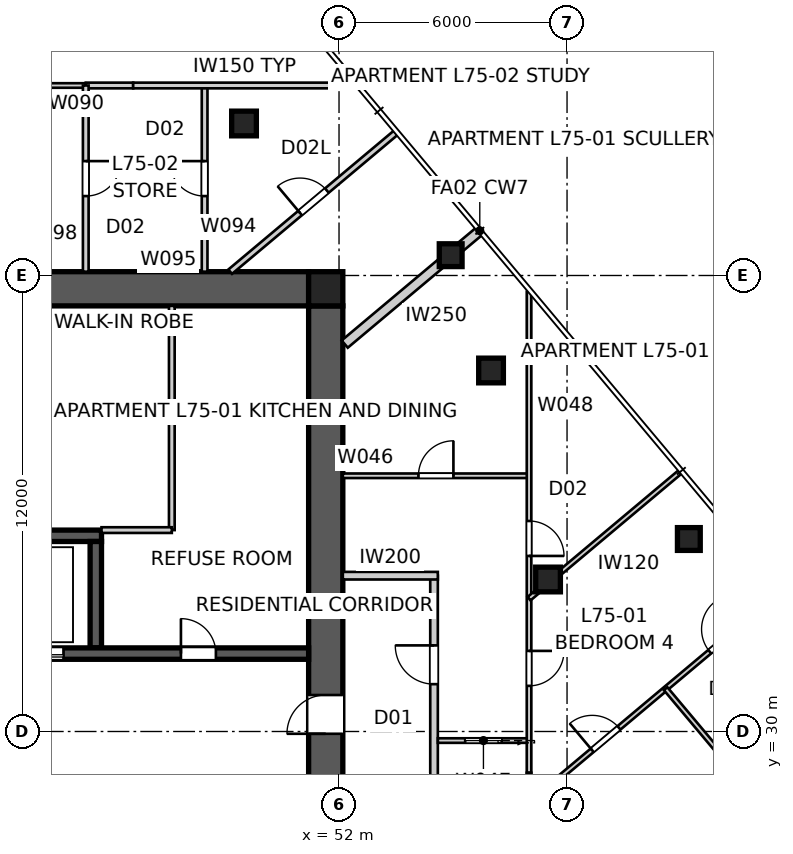
"""IFC4 building model, lengths in metres.
Left out: names, types, materials, properties, quantities, classifications, styles, units other than length and angle.
Written with IfcOpenShell. Run it as: python <this file> out.ifc"""

import sys

from ifc_helpers import new_model, si_unit, direction, frame, frame_2d, origin, origin_2d, place, context, subcontext, project, spatial, polyline, rectangle, outline, extrude, element, fill, save


model = new_model("IFC4")
c1 = context("Model", 3, precision=1e-05, world=origin(), true_north=direction((0.0, 1.0)))
c2 = subcontext(c1, "Body", "Model", "MODEL_VIEW")
j1 = project(units=[si_unit("LENGTHUNIT", "METRE"), si_unit("PLANEANGLEUNIT", "RADIAN")], contexts=[c1])
p1 = place(None, origin())
s1 = spatial("IfcSite", under=j1, at=p1, CompositionType="ELEMENT")
p2 = place(p1, origin())
s2 = spatial("IfcBuilding", under=s1, at=p2, CompositionType="ELEMENT")
p3 = place(p2, frame((0.0, 0.0, 272.6)))
s3 = spatial("IfcBuildingStorey", under=s2, at=p3, CompositionType="ELEMENT", Elevation=272.6)
p4 = place(p3, frame((28.8, 41.65, 0.0), z_axis=(0.0, 0.0, 1.0), x_axis=(1.0, 0.0, 0.0)))
e1 = element("IfcWall", 1, at=p4, inside=s3, PredefinedType="SHEAR", context=c2, shape_type="SweptSolid", body=[
    extrude(outline(polyline([(0.0, -0.45), (22.4, -0.45), (22.4, -0.025), (22.85, -0.025), (22.85, 0.025), (22.4, 0.025), (22.4, 0.45), (0.0, 0.45), (0.0, 0.025), (-0.45, 0.025), (-0.45, -0.025), (0.0, -0.025), (0.0, -0.45)])), origin(), (0.0, 0.0, 1.0), 3.4),
])
p5 = place(p3, frame((51.65, 18.8, 0.0), z_axis=(0.0, 0.0, 1.0), x_axis=(0.0, 1.0, 0.0)))
e2 = element("IfcWall", 2, at=p5, inside=s3, PredefinedType="SHEAR", context=c2, shape_type="SweptSolid", body=[
    extrude(outline(polyline([(0.0, -0.45), (22.4, -0.45), (22.4, -0.025), (22.85, -0.025), (22.85, 0.025), (22.4, 0.025), (22.4, 0.45), (0.0, 0.45), (0.0, 0.025), (-0.45, 0.025), (-0.45, -0.025), (0.0, -0.025), (0.0, -0.45)])), origin(), (0.0, 0.0, 1.0), 3.4),
])
p6 = place(p5, frame((11.14, 0.0, 0.0)))
e3 = element("IfcOpeningElement", 3, at=p6, cuts=e2, PredefinedType="OPENING", context=c2, shape_type="SweptSolid", body=[
    extrude(rectangle(XDim=1.02, YDim=2.4, at=frame_2d((0.51, 1.2))), frame((0.0, 0.46, 0.0), z_axis=(0.0, -1.0, 0.0), x_axis=(1.0, 0.0, 0.0)), (0.0, 0.0, 1.0), 0.92),
])
p7 = place(p3, frame((28.8, 32.05, 0.0), z_axis=(0.0, 0.0, 1.0), x_axis=(1.0, 0.0, 0.0)))
e4 = element("IfcWall", 4, at=p7, inside=s3, PredefinedType="SHEAR", context=c2, shape_type="SweptSolid", body=[
    extrude(rectangle(XDim=22.4, YDim=0.3, at=frame_2d((11.2, 0.0))), origin(), (0.0, 0.0, 1.0), 3.4),
])
p8 = place(p7, frame((19.04, 0.0, 0.0)))
e5 = element("IfcOpeningElement", 5, at=p8, cuts=e4, PredefinedType="OPENING", context=c2, shape_type="SweptSolid", body=[
    extrude(rectangle(XDim=0.92, YDim=2.1, at=frame_2d((0.46, 1.05))), frame((0.0, 0.16, 0.0), z_axis=(0.0, -1.0, 0.0), x_axis=(1.0, 0.0, 0.0)), (0.0, 0.0, 1.0), 0.32),
])
p9 = place(p7, frame((1.265, 0.0, 0.0)))
e6 = element("IfcOpeningElement", 6, at=p9, cuts=e4, PredefinedType="OPENING", context=c2, shape_type="SweptSolid", body=[
    extrude(rectangle(XDim=1.02, YDim=2.1, at=frame_2d((0.51, 1.05))), frame((0.0, 0.16, 0.0), z_axis=(0.0, -1.0, 0.0), x_axis=(1.0, 0.0, 0.0)), (0.0, 0.0, 1.0), 0.32),
])
p10 = place(p7, frame((4.015, 0.0, 0.0)))
e7 = element("IfcOpeningElement", 7, at=p10, cuts=e4, PredefinedType="OPENING", context=c2, shape_type="SweptSolid", body=[
    extrude(rectangle(XDim=0.92, YDim=2.1, at=frame_2d((0.46, 1.05))), frame((0.0, 0.16, 0.0), z_axis=(0.0, -1.0, 0.0), x_axis=(1.0, 0.0, 0.0)), (0.0, 0.0, 1.0), 0.32),
])
p11 = place(p7, frame((6.565, 0.0, 0.0)))
e8 = element("IfcOpeningElement", 8, at=p11, cuts=e4, PredefinedType="OPENING", context=c2, shape_type="SweptSolid", body=[
    extrude(rectangle(XDim=0.92, YDim=2.1, at=frame_2d((0.46, 1.05))), frame((0.0, 0.16, 0.0), z_axis=(0.0, -1.0, 0.0), x_axis=(1.0, 0.0, 0.0)), (0.0, 0.0, 1.0), 0.32),
])
p12 = place(p7, frame((8.89, 0.0, 0.0)))
e9 = element("IfcOpeningElement", 9, at=p12, cuts=e4, PredefinedType="OPENING", context=c2, shape_type="SweptSolid", body=[
    extrude(rectangle(XDim=0.92, YDim=2.1, at=frame_2d((0.46, 1.05))), frame((0.0, 0.16, 0.0), z_axis=(0.0, -1.0, 0.0), x_axis=(1.0, 0.0, 0.0)), (0.0, 0.0, 1.0), 0.32),
])
p13 = place(p7, frame((12.05, 0.0, 0.0)))
e10 = element("IfcOpeningElement", 10, at=p13, cuts=e4, PredefinedType="OPENING", context=c2, shape_type="SweptSolid", body=[
    extrude(rectangle(XDim=1.1, YDim=2.1, at=frame_2d((0.55, 1.05))), frame((0.0, 0.16, 0.0), z_axis=(0.0, -1.0, 0.0), x_axis=(1.0, 0.0, 0.0)), (0.0, 0.0, 1.0), 0.32),
])
p14 = place(p7, frame((14.85, 0.0, 0.0)))
e11 = element("IfcOpeningElement", 11, at=p14, cuts=e4, PredefinedType="OPENING", context=c2, shape_type="SweptSolid", body=[
    extrude(rectangle(XDim=1.1, YDim=2.1, at=frame_2d((0.55, 1.05))), frame((0.0, 0.16, 0.0), z_axis=(0.0, -1.0, 0.0), x_axis=(1.0, 0.0, 0.0)), (0.0, 0.0, 1.0), 0.32),
])
p15 = place(p3, frame((34.25, 35.15, 0.0), z_axis=(0.0, 0.0, 1.0), x_axis=(1.0, 0.0, 0.0)))
e12 = element("IfcWall", 12, at=p15, inside=s3, PredefinedType="SHEAR", context=c2, shape_type="SweptSolid", body=[
    extrude(rectangle(XDim=11.5, YDim=0.3, at=frame_2d((5.75, 0.0))), origin(), (0.0, 0.0, 1.0), 3.4),
])
p16 = place(p3, frame((45.6, 32.2, 0.0), z_axis=(0.0, 0.0, 1.0), x_axis=(0.0, 1.0, 0.0)))
e13 = element("IfcWall", 13, at=p16, inside=s3, PredefinedType="SHEAR", context=c2, shape_type="SweptSolid", body=[
    extrude(rectangle(XDim=2.8, YDim=0.3, at=frame_2d((1.4, 0.0))), origin(), (0.0, 0.0, 1.0), 3.4),
])
p17 = place(p3, frame((51.65, 41.65, 0.0), z_axis=(0.0, 0.0, 1.0), x_axis=(1.0, 0.0, 0.0)))
e14 = element("IfcColumn", 14, at=p17, inside=s3, PredefinedType="COLUMN", context=c2, shape_type="SweptSolid", body=[
    extrude(rectangle(XDim=0.9, YDim=0.9, at=origin_2d()), origin(), (0.0, 0.0, 1.0), 3.4),
])
for number, where, z_axis, x_axis in (
    (15, (61.205, 35.065, -0.15), (0.0, 0.0, 1.0), (1.0, 0.0, 0.0)),
    (16, (54.938, 42.534, -0.15), (0.0, 0.0, 1.0), (1.0, 0.0, 0.0)),
):
    element("IfcColumn", number, at=place(p3, frame(where, z_axis=z_axis, x_axis=x_axis)), inside=s3, PredefinedType="COLUMN", context=c2, shape_type="SweptSolid", body=[
        extrude(rectangle(XDim=0.6, YDim=0.6, at=origin_2d()), origin(), (0.0, 0.0, 1.0), 3.55),
    ])
for number, where, z_axis, x_axis in (
    (17, (57.5, 34.0, 0.0), (0.0, 0.0, 1.0), (1.0, 0.0, 0.0)),
    (18, (56.0, 39.5, 0.0), (0.0, 0.0, 1.0), (1.0, 0.0, 0.0)),
    (19, (49.5, 46.0, 0.0), (0.0, 0.0, 1.0), (1.0, 0.0, 0.0)),
):
    element("IfcColumn", number, at=place(p3, frame(where, z_axis=z_axis, x_axis=x_axis)), inside=s3, PredefinedType="COLUMN", context=c2, shape_type="SweptSolid", body=[
        extrude(rectangle(XDim=0.65, YDim=0.65, at=origin_2d()), origin(), (0.0, 0.0, 1.0), 3.4),
    ])
p18 = place(p3, frame((54.5, 25.9, 0.0), z_axis=(0.0, 0.0, 1.0), x_axis=(0.0, 1.0, 0.0)))
e20 = element("IfcWall", 20, at=p18, inside=s3, PredefinedType="PARTITIONING", context=c2, shape_type="SweptSolid", body=[
    extrude(rectangle(XDim=8.2, YDim=0.2, at=frame_2d((4.1, 0.0))), origin(), (0.0, 0.0, 1.0), 3.25),
])
p19 = place(p18, frame((5.346, 0.0, 0.0)))
e21 = element("IfcOpeningElement", 21, at=p19, cuts=e20, PredefinedType="OPENING", context=c2, shape_type="SweptSolid", body=[
    extrude(rectangle(XDim=1.02, YDim=2.34, at=frame_2d((0.51, 1.17))), frame((0.0, 0.11, 0.0), z_axis=(0.0, -1.0, 0.0), x_axis=(1.0, 0.0, 0.0)), (0.0, 0.0, 1.0), 0.22),
])
p20 = place(p3, frame((52.1, 34.1, 0.0), z_axis=(0.0, 0.0, 1.0), x_axis=(1.0, 0.0, 0.0)))
e22 = element("IfcWall", 22, at=p20, inside=s3, PredefinedType="PARTITIONING", context=c2, shape_type="SweptSolid", body=[
    extrude(rectangle(XDim=2.5, YDim=0.2, at=frame_2d((1.25, 0.0))), origin(), (0.0, 0.0, 1.0), 3.25),
])
p21 = place(p3, frame((55.704, 43.177, 0.0), z_axis=(0.0, 0.0, 1.0), x_axis=(-0.76603440109, -0.64279957712, 0.0)))
e23 = element("IfcWall", 23, at=p21, inside=s3, PredefinedType="PARTITIONING", context=c2, shape_type="SweptSolid", body=[
    extrude(rectangle(XDim=4.64, YDim=0.25, at=frame_2d((2.32, 0.0))), origin(), (0.0, 0.0, 1.0), 3.25),
])
p22 = place(p3, frame((47.6, 41.2, 0.0), z_axis=(0.0, 0.0, 1.0), x_axis=(0.0, -1.0, 0.0)))
e24 = element("IfcWall", 24, at=p22, inside=s3, PredefinedType="SOLIDWALL", context=c2, shape_type="SweptSolid", body=[
    extrude(rectangle(XDim=5.9, YDim=0.15, at=frame_2d((2.95, 0.0))), origin(), (0.0, 0.0, 1.0), 3.25),
])
p23 = place(p3, frame((47.6, 35.3, 0.0), z_axis=(0.0, 0.0, 1.0), x_axis=(-1.0, 0.0, 0.0)))
e25 = element("IfcWall", 25, at=p23, inside=s3, PredefinedType="SOLIDWALL", context=c2, shape_type="SweptSolid", body=[
    extrude(rectangle(XDim=1.85, YDim=0.15, at=frame_2d((0.925, 0.0))), origin(), (0.0, 0.0, 1.0), 3.25),
])
p24 = place(p3, frame((52.1, 36.73, 0.0), z_axis=(0.0, 0.0, 1.0), x_axis=(1.0, 0.0, 0.0)))
e26 = element("IfcWall", 26, at=p24, inside=s3, PredefinedType="PARTITIONING", context=c2, shape_type="SweptSolid", body=[
    extrude(rectangle(XDim=4.9, YDim=0.12, at=frame_2d((2.45, 0.0))), origin(), (0.0, 0.0, 1.0), 3.25),
])
p25 = place(p24, frame((1.99, 0.0, 0.0)))
e27 = element("IfcOpeningElement", 27, at=p25, cuts=e26, PredefinedType="OPENING", context=c2, shape_type="SweptSolid", body=[
    extrude(rectangle(XDim=0.92, YDim=2.34, at=frame_2d((0.46, 1.17))), frame((0.0, 0.07, 0.0), z_axis=(0.0, -1.0, 0.0), x_axis=(1.0, 0.0, 0.0)), (0.0, 0.0, 1.0), 0.14),
])
p26 = place(p3, frame((57.0, 29.761, 0.0), z_axis=(0.0, 0.0, 1.0), x_axis=(-1.0, 0.0, 0.0)))
e28 = element("IfcWall", 28, at=p26, inside=s3, PredefinedType="PARTITIONING", context=c2, shape_type="SweptSolid", body=[
    extrude(rectangle(XDim=2.4, YDim=0.12, at=frame_2d((1.2, 0.0))), origin(), (0.0, 0.0, 1.0), 3.25),
])
p27 = place(p26, frame((0.72, 0.0, 0.0)))
e29 = element("IfcOpeningElement", 29, at=p27, cuts=e28, PredefinedType="OPENING", context=c2, shape_type="SweptSolid", body=[
    extrude(rectangle(XDim=0.96, YDim=2.1, at=frame_2d((0.48, 1.05))), frame((0.0, 0.07, 0.0), z_axis=(0.0, -1.0, 0.0), x_axis=(1.0, 0.0, 0.0)), (0.0, 0.0, 1.0), 0.14),
])
p28 = place(p3, frame((57.0, 41.57, 0.0), z_axis=(0.0, 0.0, 1.0), x_axis=(0.0, -1.0, 0.0)))
e30 = element("IfcWall", 30, at=p28, inside=s3, PredefinedType="PARTITIONING", context=c2, shape_type="SweptSolid", body=[
    extrude(rectangle(XDim=12.656, YDim=0.12, at=frame_2d((6.328, 0.0))), origin(), (0.0, 0.0, 1.0), 2.55),
])
p29 = place(p28, frame((9.449, 0.0, 0.0)))
e31 = element("IfcOpeningElement", 31, at=p29, cuts=e30, PredefinedType="OPENING", context=c2, shape_type="SweptSolid", body=[
    extrude(rectangle(XDim=0.92, YDim=2.34, at=frame_2d((0.46, 1.17))), frame((0.0, 0.07, 0.0), z_axis=(0.0, -1.0, 0.0), x_axis=(1.0, 0.0, 0.0)), (0.0, 0.0, 1.0), 0.14),
])
p30 = place(p28, frame((6.031, 0.0, 0.0)))
e32 = element("IfcOpeningElement", 32, at=p30, cuts=e30, PredefinedType="OPENING", context=c2, shape_type="SweptSolid", body=[
    extrude(rectangle(XDim=0.92, YDim=2.34, at=frame_2d((0.46, 1.17))), frame((0.0, 0.07, 0.0), z_axis=(0.0, -1.0, 0.0), x_axis=(1.0, 0.0, 0.0)), (0.0, 0.0, 1.0), 0.14),
])
p31 = place(p3, frame((57.434, 28.475, 0.0), z_axis=(0.0, 0.0, 1.0), x_axis=(0.766033729027, 0.642800378028, 0.0)))
e33 = element("IfcWall", 33, at=p31, inside=s3, PredefinedType="PARTITIONING", context=c2, shape_type="SweptSolid", body=[
    extrude(rectangle(XDim=8.085, YDim=0.12, at=frame_2d((4.042, 0.0))), origin(), (0.0, 0.0, 1.0), 3.25),
])
p32 = place(p31, frame((1.603, 0.0, 0.0)))
e34 = element("IfcOpeningElement", 34, at=p32, cuts=e33, PredefinedType="OPENING", context=c2, shape_type="SweptSolid", body=[
    extrude(rectangle(XDim=0.92, YDim=2.34, at=frame_2d((0.46, 1.17))), frame((0.0, 0.07, 0.0), z_axis=(0.0, -1.0, 0.0), x_axis=(1.0, 0.0, 0.0)), (0.0, 0.0, 1.0), 0.14),
])
p33 = place(p31, frame((5.64, 0.0, 0.0)))
e35 = element("IfcOpeningElement", 35, at=p33, cuts=e33, PredefinedType="OPENING", context=c2, shape_type="SweptSolid", body=[
    extrude(rectangle(XDim=0.92, YDim=2.34, at=frame_2d((0.46, 1.17))), frame((0.0, 0.07, 0.0), z_axis=(0.0, -1.0, 0.0), x_axis=(1.0, 0.0, 0.0)), (0.0, 0.0, 1.0), 0.14),
])
p34 = place(p3, frame((60.594, 31.126, 0.0), z_axis=(0.0, 0.0, 1.0), x_axis=(0.642767300664, -0.766061483953, 0.0)))
e36 = element("IfcWall", 36, at=p34, inside=s3, PredefinedType="PARTITIONING", context=c2, shape_type="SweptSolid", body=[
    extrude(rectangle(XDim=4.085, YDim=0.12, at=frame_2d((2.042, 0.0))), origin(), (0.0, 0.0, 1.0), 3.25),
])
p35 = place(p3, frame((57.0, 33.495, 0.0), z_axis=(0.0, 0.0, 1.0), x_axis=(0.76605407051, 0.642776136034, 0.0)))
e37 = element("IfcWall", 37, at=p35, inside=s3, PredefinedType="PARTITIONING", context=c2, shape_type="SweptSolid", body=[
    extrude(rectangle(XDim=5.191, YDim=0.12, at=frame_2d((2.595, 0.0))), origin(), (0.0, 0.0, 1.0), 3.25),
])
p36 = place(p3, frame((41.824, 47.0, 0.0), z_axis=(0.0, 0.0, 1.0), x_axis=(1.0, 0.0, 0.0)))
e38 = element("IfcWall", 38, at=p36, inside=s3, PredefinedType="PARTITIONING", context=c2, shape_type="SweptSolid", body=[
    extrude(rectangle(XDim=3.511, YDim=0.12, at=frame_2d((1.756, 0.0))), origin(), (0.0, 0.0, 1.0), 3.25),
])
p37 = place(p36, frame((0.887, 0.0, 0.0)))
e39 = element("IfcOpeningElement", 39, at=p37, cuts=e38, PredefinedType="OPENING", context=c2, shape_type="SweptSolid", body=[
    extrude(rectangle(XDim=0.92, YDim=2.34, at=frame_2d((0.46, 1.17))), frame((0.0, 0.07, 0.0), z_axis=(0.0, -1.0, 0.0), x_axis=(1.0, 0.0, 0.0)), (0.0, 0.0, 1.0), 0.14),
])
p38 = place(p3, frame((49.136, 42.1, 0.0), z_axis=(0.0, 0.0, 1.0), x_axis=(0.766055078255, 0.642774935012, 0.0)))
e40 = element("IfcWall", 40, at=p38, inside=s3, PredefinedType="SOLIDWALL", context=c2, shape_type="SweptSolid", body=[
    extrude(rectangle(XDim=5.684, YDim=0.15, at=frame_2d((2.842, 0.0))), origin(), (0.0, 0.0, 1.0), 3.25),
])
p39 = place(p38, frame((2.402, 0.0, 0.0)))
e41 = element("IfcOpeningElement", 41, at=p39, cuts=e40, PredefinedType="OPENING", context=c2, shape_type="SweptSolid", body=[
    extrude(rectangle(XDim=0.92, YDim=2.1, at=frame_2d((0.46, 1.05))), frame((0.0, 0.085, 0.0), z_axis=(0.0, -1.0, 0.0), x_axis=(1.0, 0.0, 0.0)), (0.0, 0.0, 1.0), 0.17),
])
p40 = place(p3, frame((48.463, 42.1, 0.0), z_axis=(0.0, 0.0, 1.0), x_axis=(0.0, 1.0, 0.0)))
e42 = element("IfcWall", 42, at=p40, inside=s3, PredefinedType="SOLIDWALL", context=c2, shape_type="SweptSolid", body=[
    extrude(rectangle(XDim=4.9, YDim=0.15, at=frame_2d((2.45, 0.0))), origin(), (0.0, 0.0, 1.0), 3.25),
])
p41 = place(p40, frame((1.99, 0.0, 0.0)))
e43 = element("IfcOpeningElement", 43, at=p41, cuts=e42, PredefinedType="OPENING", context=c2, shape_type="SweptSolid", body=[
    extrude(rectangle(XDim=0.92, YDim=2.34, at=frame_2d((0.46, 1.17))), frame((0.0, 0.085, 0.0), z_axis=(0.0, -1.0, 0.0), x_axis=(1.0, 0.0, 0.0)), (0.0, 0.0, 1.0), 0.17),
])
p42 = place(p3, frame((45.336, 47.0, 0.0), z_axis=(0.0, 0.0, 1.0), x_axis=(1.0, 0.0, 0.0)))
e44 = element("IfcWall", 44, at=p42, inside=s3, PredefinedType="SOLIDWALL", context=c2, shape_type="SweptSolid", body=[
    extrude(rectangle(XDim=1.248, YDim=0.15, at=frame_2d((0.624, 0.0))), origin(), (0.0, 0.0, 1.0), 2.55),
])
p43 = place(p3, frame((46.583, 47.0, 0.0), z_axis=(0.0, 0.0, 1.0), x_axis=(1.0, 0.0, 0.0)))
e45 = element("IfcWall", 45, at=p43, inside=s3, PredefinedType="SOLIDWALL", context=c2, shape_type="SweptSolid", body=[
    extrude(rectangle(XDim=5.86, YDim=0.15, at=frame_2d((2.93, 0.0))), origin(), (0.0, 0.0, 1.0), 3.25),
])
p44 = place(p3, frame((45.336, 47.0, 0.0), z_axis=(0.0, 0.0, 1.0), x_axis=(0.0, -1.0, 0.0)))
e46 = element("IfcWall", 46, at=p44, inside=s3, PredefinedType="SOLIDWALL", context=c2, shape_type="SweptSolid", body=[
    extrude(rectangle(XDim=4.9, YDim=0.15, at=frame_2d((2.45, 0.0))), origin(), (0.0, 0.0, 1.0), 3.25),
])
p45 = place(p44, frame((1.99, 0.0, 0.0)))
e47 = element("IfcOpeningElement", 47, at=p45, cuts=e46, PredefinedType="OPENING", context=c2, shape_type="SweptSolid", body=[
    extrude(rectangle(XDim=0.92, YDim=2.34, at=frame_2d((0.46, 1.17))), frame((0.0, 0.085, 0.0), z_axis=(0.0, -1.0, 0.0), x_axis=(1.0, 0.0, 0.0)), (0.0, 0.0, 1.0), 0.17),
])
p46 = place(p3, frame((47.719, 52.631, 0.0), z_axis=(0.0, 0.0, 1.0), x_axis=(-0.766033729027, -0.642800378028, 0.0)))
e48 = element("IfcWall", 48, at=p46, inside=s3, PredefinedType="PARTITIONING", context=c2, shape_type="SweptSolid", body=[
    extrude(rectangle(XDim=8.085, YDim=0.12, at=frame_2d((4.042, 0.0))), origin(), (0.0, 0.0, 1.0), 3.25),
])
p47 = place(p3, frame((57.0, 28.915, 0.0), z_axis=(0.0, 0.0, 1.0), x_axis=(0.0, -1.0, 0.0)))
e49 = element("IfcWall", 49, at=p47, inside=s3, PredefinedType="PARTITIONING", context=c2, shape_type="SweptSolid", body=[
    extrude(rectangle(XDim=0.676, YDim=0.12, at=frame_2d((0.338, 0.0))), origin(), (0.0, 0.0, 1.0), 3.25),
])
p48 = place(p8, origin())
e50 = element("IfcDoor", 50, at=p48, inside=s3, OperationType="SINGLE_SWING_LEFT", PredefinedType="DOOR", context=c2, shape_type="SweptSolid", body=[
    extrude(rectangle(XDim=0.92, YDim=2.1, at=frame_2d((0.46, 1.05))), frame((0.0, 0.025, 0.0), z_axis=(0.0, -1.0, 0.0), x_axis=(1.0, 0.0, 0.0)), (0.0, 0.0, 1.0), 0.05),
])
fill(e5, e50)
p49 = place(p19, origin())
e51 = element("IfcDoor", 51, at=p49, inside=s3, OperationType="SINGLE_SWING_RIGHT", PredefinedType="DOOR", context=c2, shape_type="SweptSolid", body=[
    extrude(rectangle(XDim=1.02, YDim=2.34, at=frame_2d((0.51, 1.17))), frame((0.0, 0.025, 0.0), z_axis=(0.0, -1.0, 0.0), x_axis=(1.0, 0.0, 0.0)), (0.0, 0.0, 1.0), 0.05),
])
fill(e21, e51)
p50 = place(p25, origin())
e52 = element("IfcDoor", 52, at=p50, inside=s3, OperationType="SINGLE_SWING_RIGHT", PredefinedType="DOOR", context=c2, shape_type="SweptSolid", body=[
    extrude(rectangle(XDim=0.92, YDim=2.34, at=frame_2d((0.46, 1.17))), frame((0.0, 0.025, 0.0), z_axis=(0.0, -1.0, 0.0), x_axis=(1.0, 0.0, 0.0)), (0.0, 0.0, 1.0), 0.05),
])
fill(e27, e52)
p51 = place(p29, origin())
e53 = element("IfcDoor", 53, at=p51, inside=s3, OperationType="SINGLE_SWING_LEFT", PredefinedType="DOOR", context=c2, shape_type="SweptSolid", body=[
    extrude(rectangle(XDim=0.92, YDim=2.34, at=frame_2d((0.46, 1.17))), frame((0.0, 0.025, 0.0), z_axis=(0.0, -1.0, 0.0), x_axis=(1.0, 0.0, 0.0)), (0.0, 0.0, 1.0), 0.05),
])
fill(e31, e53)
p52 = place(p30, origin())
e54 = element("IfcDoor", 54, at=p52, inside=s3, OperationType="SINGLE_SWING_RIGHT", PredefinedType="DOOR", context=c2, shape_type="SweptSolid", body=[
    extrude(rectangle(XDim=0.92, YDim=2.34, at=frame_2d((0.46, 1.17))), frame((0.0, 0.025, 0.0), z_axis=(0.0, -1.0, 0.0), x_axis=(1.0, 0.0, 0.0)), (0.0, 0.0, 1.0), 0.05),
])
fill(e32, e54)
p53 = place(p27, origin())
e55 = element("IfcDoor", 55, at=p53, inside=s3, OperationType="SLIDING_TO_LEFT", PredefinedType="DOOR", context=c2, shape_type="SweptSolid", body=[
    extrude(rectangle(XDim=0.96, YDim=2.1, at=frame_2d((0.48, 1.05))), frame((0.0, 0.025, 0.0), z_axis=(0.0, -1.0, 0.0), x_axis=(1.0, 0.0, 0.0)), (0.0, 0.0, 1.0), 0.05),
])
fill(e29, e55)
p54 = place(p45, origin())
e56 = element("IfcDoor", 56, at=p54, inside=s3, OperationType="SINGLE_SWING_LEFT", PredefinedType="DOOR", context=c2, shape_type="SweptSolid", body=[
    extrude(rectangle(XDim=0.92, YDim=2.34, at=frame_2d((0.46, 1.17))), frame((0.0, 0.025, 0.0), z_axis=(0.0, -1.0, 0.0), x_axis=(1.0, 0.0, 0.0)), (0.0, 0.0, 1.0), 0.05),
])
fill(e47, e56)
p55 = place(p41, origin())
e57 = element("IfcDoor", 57, at=p55, inside=s3, OperationType="SINGLE_SWING_RIGHT", PredefinedType="DOOR", context=c2, shape_type="SweptSolid", body=[
    extrude(rectangle(XDim=0.92, YDim=2.34, at=frame_2d((0.46, 1.17))), frame((0.0, 0.025, 0.0), z_axis=(0.0, -1.0, 0.0), x_axis=(1.0, 0.0, 0.0)), (0.0, 0.0, 1.0), 0.05),
])
fill(e43, e57)
p56 = place(p39, origin())
e58 = element("IfcDoor", 58, at=p56, inside=s3, OperationType="SINGLE_SWING_LEFT", PredefinedType="DOOR", context=c2, shape_type="SweptSolid", body=[
    extrude(rectangle(XDim=0.92, YDim=2.1, at=frame_2d((0.46, 1.05))), frame((0.0, 0.025, 0.0), z_axis=(0.0, -1.0, 0.0), x_axis=(1.0, 0.0, 0.0)), (0.0, 0.0, 1.0), 0.05),
])
fill(e41, e58)
p57 = place(p32, origin())
e59 = element("IfcDoor", 59, at=p57, inside=s3, OperationType="SINGLE_SWING_LEFT", PredefinedType="DOOR", context=c2, shape_type="SweptSolid", body=[
    extrude(rectangle(XDim=0.92, YDim=2.34, at=frame_2d((0.46, 1.17))), frame((0.0, 0.025, 0.0), z_axis=(0.0, -1.0, 0.0), x_axis=(1.0, 0.0, 0.0)), (0.0, 0.0, 1.0), 0.05),
])
fill(e34, e59)
p58 = place(p33, origin())
e60 = element("IfcDoor", 60, at=p58, inside=s3, OperationType="SINGLE_SWING_RIGHT", PredefinedType="DOOR", context=c2, shape_type="SweptSolid", body=[
    extrude(rectangle(XDim=0.92, YDim=2.34, at=frame_2d((0.46, 1.17))), frame((0.0, 0.025, 0.0), z_axis=(0.0, -1.0, 0.0), x_axis=(1.0, 0.0, 0.0)), (0.0, 0.0, 1.0), 0.05),
])
fill(e35, e60)
p59 = place(p6, origin())
e61 = element("IfcDoor", 61, at=p59, inside=s3, OperationType="SINGLE_SWING_LEFT", PredefinedType="DOOR", context=c2, shape_type="SweptSolid", body=[
    extrude(rectangle(XDim=1.02, YDim=2.4, at=frame_2d((0.51, 1.2))), frame((0.0, 0.025, 0.0), z_axis=(0.0, -1.0, 0.0), x_axis=(1.0, 0.0, 0.0)), (0.0, 0.0, 1.0), 0.05),
])
fill(e3, e61)
p60 = place(p14, origin())
e62 = element("IfcDoor", 62, at=p60, inside=s3, OperationType="SLIDING_TO_LEFT", PredefinedType="DOOR", context=c2, shape_type="SweptSolid", body=[
    extrude(rectangle(XDim=1.1, YDim=2.1, at=frame_2d((0.55, 1.05))), frame((0.0, 0.025, 0.0), z_axis=(0.0, -1.0, 0.0), x_axis=(1.0, 0.0, 0.0)), (0.0, 0.0, 1.0), 0.05),
])
fill(e11, e62)
save(model, sys.argv[1])
